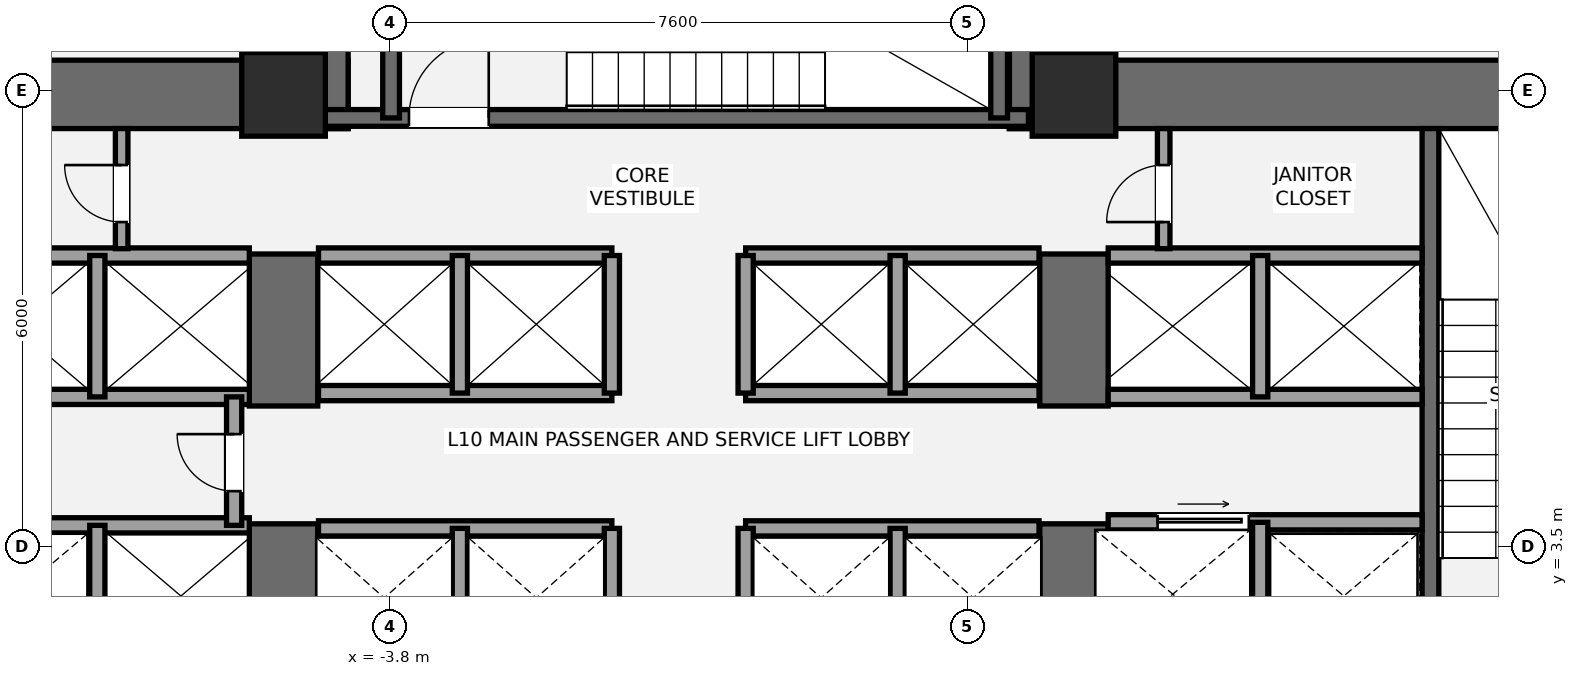
"""IFC4 building model, lengths in metres.
Left out: names, types, materials, properties, quantities, classifications, styles, units other than length and angle.
Written with IfcOpenShell. Run it as: python <this file> out.ifc"""

import sys

from ifc_helpers import new_model, si_unit, direction, frame, frame_2d, origin, origin_2d, place, context, subcontext, project, spatial, rectangle, extrude, element, fill, save


model = new_model("IFC4")
c1 = context("Model", 3, precision=1e-05, world=origin(), true_north=direction((0.0, 1.0)))
c2 = subcontext(c1, "Body", "Model", "MODEL_VIEW")
j1 = project(units=[si_unit("LENGTHUNIT", "METRE"), si_unit("PLANEANGLEUNIT", "RADIAN")], contexts=[c1])
p1 = place(None, origin())
s1 = spatial("IfcSite", under=j1, at=p1, CompositionType="ELEMENT")
p2 = place(p1, origin())
s2 = spatial("IfcBuilding", under=s1, at=p2, CompositionType="ELEMENT")
p3 = place(p2, frame((0.0, 0.0, 41.4)))
s3 = spatial("IfcBuildingStorey", under=s2, at=p3, CompositionType="ELEMENT", Elevation=41.4)
p4 = place(p3, frame((-14.05, 9.45, 0.0), z_axis=(0.0, 0.0, 1.0), x_axis=(1.0, 0.0, 0.0)))
e1 = element("IfcWall", 1, at=p4, inside=s3, PredefinedType="SHEAR", context=c2, shape_type="SweptSolid", body=[
    extrude(rectangle(XDim=9.7, YDim=0.9, at=frame_2d((4.85, 0.0))), origin(), (0.0, 0.0, 1.0), 3.6),
])
p5 = place(p3, frame((-5.2, 0.95, 0.0), z_axis=(0.0, 0.0, 1.0), x_axis=(0.0, 1.0, 0.0)))
e2 = element("IfcWall", 2, at=p5, inside=s3, PredefinedType="SHEAR", context=c2, shape_type="SweptSolid", body=[
    extrude(rectangle(XDim=2.85, YDim=0.9, at=frame_2d((1.425, 0.0))), origin(), (0.0, 0.0, 1.0), 3.6),
])
p6 = place(p3, frame((-5.2, 5.35, 0.0), z_axis=(0.0, 0.0, 1.0), x_axis=(0.0, 1.0, 0.0)))
e3 = element("IfcWall", 3, at=p6, inside=s3, PredefinedType="SHEAR", context=c2, shape_type="SweptSolid", body=[
    extrude(rectangle(XDim=2.0, YDim=0.9, at=frame_2d((1.0, 0.0))), origin(), (0.0, 0.0, 1.0), 3.6),
])
p7 = place(p3, frame((4.35, 9.45, 0.0), z_axis=(0.0, 0.0, 1.0), x_axis=(1.0, 0.0, 0.0)))
e4 = element("IfcWall", 4, at=p7, inside=s3, PredefinedType="SHEAR", context=c2, shape_type="SweptSolid", body=[
    extrude(rectangle(XDim=9.7, YDim=0.9, at=frame_2d((4.85, 0.0))), origin(), (0.0, 0.0, 1.0), 3.6),
])
p8 = place(p3, frame((5.2, 0.95, 0.0), z_axis=(0.0, 0.0, 1.0), x_axis=(0.0, 1.0, 0.0)))
e5 = element("IfcWall", 5, at=p8, inside=s3, PredefinedType="SHEAR", context=c2, shape_type="SweptSolid", body=[
    extrude(rectangle(XDim=2.85, YDim=0.9, at=frame_2d((1.425, 0.0))), origin(), (0.0, 0.0, 1.0), 3.6),
])
p9 = place(p3, frame((5.2, 5.35, 0.0), z_axis=(0.0, 0.0, 1.0), x_axis=(0.0, 1.0, 0.0)))
e6 = element("IfcWall", 6, at=p9, inside=s3, PredefinedType="SHEAR", context=c2, shape_type="SweptSolid", body=[
    extrude(rectangle(XDim=2.0, YDim=0.9, at=frame_2d((1.0, 0.0))), origin(), (0.0, 0.0, 1.0), 3.6),
])
p10 = place(p3, frame((9.89, 1.85, 0.0), z_axis=(0.0, 0.0, 1.0), x_axis=(0.0, 1.0, 0.0)))
e7 = element("IfcWall", 7, at=p10, inside=s3, PredefinedType="SHEAR", context=c2, shape_type="SweptSolid", body=[
    extrude(rectangle(XDim=7.15, YDim=0.22, at=frame_2d((3.575, 0.0))), origin(), (0.0, 0.0, 1.0), 3.6),
])
for number, where, z_axis, x_axis in (
    (8, (-4.8, 9.0, 0.0), (0.0, 0.0, 1.0), (0.0, 1.0, 0.0)),
    (9, (4.8, 9.0, 0.0), (0.0, 0.0, 1.0), (0.0, 1.0, 0.0)),
):
    element("IfcWall", number, at=place(p3, frame(where, z_axis=z_axis, x_axis=x_axis)), inside=s3, PredefinedType="SHEAR", context=c2, shape_type="SweptSolid", body=[
        extrude(rectangle(XDim=4.3, YDim=0.9, at=frame_2d((2.15, 0.0))), origin(), (0.0, 0.0, 1.0), 3.6),
    ])
p11 = place(p3, frame((-4.7, 9.14, 0.0), z_axis=(0.0, 0.0, 1.0), x_axis=(1.0, 0.0, 0.0)))
e10 = element("IfcWall", 10, at=p11, inside=s3, PredefinedType="SHEAR", context=c2, shape_type="SweptSolid", body=[
    extrude(rectangle(XDim=9.3, YDim=0.22, at=frame_2d((4.65, 0.0))), origin(), (0.0, 0.0, 1.0), 3.6),
])
p12 = place(p11, frame((1.15, 0.0, 0.0)))
e11 = element("IfcOpeningElement", 11, at=p12, cuts=e10, PredefinedType="OPENING", context=c2, shape_type="SweptSolid", body=[
    extrude(rectangle(XDim=1.05, YDim=2.15, at=frame_2d((0.525, 1.075))), frame((0.0, 0.12, 0.0), z_axis=(0.0, -1.0, 0.0), x_axis=(1.0, 0.0, 0.0)), (0.0, 0.0, 1.0), 0.24),
])
for number, where, z_axis, x_axis in (
    (12, (-3.785, 9.14, 0.0), (0.0, 0.0, 1.0), (0.0, 1.0, 0.0)),
    (13, (4.215, 9.14, 0.0), (0.0, 0.0, 1.0), (0.0, 1.0, 0.0)),
):
    element("IfcWall", number, at=place(p3, frame(where, z_axis=z_axis, x_axis=x_axis)), inside=s3, PredefinedType="SHEAR", context=c2, shape_type="SweptSolid", body=[
        extrude(rectangle(XDim=3.26, YDim=0.22, at=frame_2d((1.63, 0.0))), origin(), (0.0, 0.0, 1.0), 3.6),
    ])
for number, where, z_axis, x_axis in (
    (14, (-5.2, 9.45, 0.0), (0.0, 0.0, 1.0), (1.0, 0.0, 0.0)),
    (15, (5.2, 9.45, 0.0), (0.0, 0.0, 1.0), (1.0, 0.0, 0.0)),
):
    element("IfcColumn", number, at=place(p3, frame(where, z_axis=z_axis, x_axis=x_axis)), inside=s3, PredefinedType="COLUMN", context=c2, shape_type="SweptSolid", body=[
        extrude(rectangle(XDim=1.1, YDim=1.1, at=origin_2d()), origin(), (0.0, 0.0, 1.0), 3.6),
    ])
p13 = place(p3, frame((-9.78, 3.78, 0.0), z_axis=(0.0, 0.0, 1.0), x_axis=(1.0, 0.0, 0.0)))
e16 = element("IfcWall", 16, at=p13, inside=s3, PredefinedType="SOLIDWALL", context=c2, shape_type="SweptSolid", body=[
    extrude(rectangle(XDim=4.13, YDim=0.2, at=frame_2d((2.065, 0.0))), origin(), (0.0, 0.0, 1.0), 3.4),
])
p14 = place(p3, frame((-7.65, 1.85, 0.0), z_axis=(0.0, 0.0, 1.0), x_axis=(0.0, 1.0, 0.0)))
e17 = element("IfcWall", 17, at=p14, inside=s3, PredefinedType="SOLIDWALL", context=c2, shape_type="SweptSolid", body=[
    extrude(rectangle(XDim=1.93, YDim=0.2, at=frame_2d((0.965, 0.0))), origin(), (0.0, 0.0, 1.0), 3.4),
])
for number, where, z_axis, x_axis in (
    (18, (-9.78, 5.47, 0.0), (0.0, 0.0, 1.0), (1.0, 0.0, 0.0)),
    (19, (-9.78, 7.33, 0.0), (0.0, 0.0, 1.0), (1.0, 0.0, 0.0)),
):
    element("IfcWall", number, at=place(p3, frame(where, z_axis=z_axis, x_axis=x_axis)), inside=s3, PredefinedType="SOLIDWALL", context=c2, shape_type="SweptSolid", body=[
        extrude(rectangle(XDim=4.13, YDim=0.2, at=frame_2d((2.065, 0.0))), origin(), (0.0, 0.0, 1.0), 3.4),
    ])
p15 = place(p3, frame((-7.65, 5.47, 0.0), z_axis=(0.0, 0.0, 1.0), x_axis=(0.0, 1.0, 0.0)))
e20 = element("IfcWall", 20, at=p15, inside=s3, PredefinedType="SOLIDWALL", context=c2, shape_type="SweptSolid", body=[
    extrude(rectangle(XDim=1.86, YDim=0.2, at=frame_2d((0.93, 0.0))), origin(), (0.0, 0.0, 1.0), 3.4),
])
p16 = place(p3, frame((-5.85, 3.78, 0.0), z_axis=(0.0, 0.0, 1.0), x_axis=(0.0, 1.0, 0.0)))
e21 = element("IfcWall", 21, at=p16, inside=s3, PredefinedType="SOLIDWALL", context=c2, shape_type="SweptSolid", body=[
    extrude(rectangle(XDim=1.69, YDim=0.2, at=frame_2d((0.845, 0.0))), origin(), (0.0, 0.0, 1.0), 3.4),
])
p17 = place(p16, frame((0.45, 0.0, 0.0)))
e22 = element("IfcOpeningElement", 22, at=p17, cuts=e21, PredefinedType="OPENING", context=c2, shape_type="SweptSolid", body=[
    extrude(rectangle(XDim=0.75, YDim=2.1, at=frame_2d((0.375, 1.05))), frame((0.0, 0.11, 0.0), z_axis=(0.0, -1.0, 0.0), x_axis=(1.0, 0.0, 0.0)), (0.0, 0.0, 1.0), 0.22),
])
p18 = place(p3, frame((5.65, 3.82, 0.0), z_axis=(0.0, 0.0, 1.0), x_axis=(1.0, 0.0, 0.0)))
e23 = element("IfcWall", 23, at=p18, inside=s3, PredefinedType="SOLIDWALL", context=c2, shape_type="SweptSolid", body=[
    extrude(rectangle(XDim=4.13, YDim=0.2, at=frame_2d((2.065, 0.0))), origin(), (0.0, 0.0, 1.0), 3.4),
])
p19 = place(p18, frame((0.65, 0.0, 0.0)))
e24 = element("IfcOpeningElement", 24, at=p19, cuts=e23, PredefinedType="OPENING", context=c2, shape_type="SweptSolid", body=[
    extrude(rectangle(XDim=1.2, YDim=2.2, at=frame_2d((0.6, 1.1))), frame((0.0, 0.11, 0.0), z_axis=(0.0, -1.0, 0.0), x_axis=(1.0, 0.0, 0.0)), (0.0, 0.0, 1.0), 0.22),
])
p20 = place(p3, frame((7.65, 1.85, 0.0), z_axis=(0.0, 0.0, 1.0), x_axis=(0.0, 1.0, 0.0)))
e25 = element("IfcWall", 25, at=p20, inside=s3, PredefinedType="SOLIDWALL", context=c2, shape_type="SweptSolid", body=[
    extrude(rectangle(XDim=1.97, YDim=0.2, at=frame_2d((0.985, 0.0))), origin(), (0.0, 0.0, 1.0), 3.4),
])
for number, where, z_axis, x_axis in (
    (26, (5.65, 5.47, 0.0), (0.0, 0.0, 1.0), (1.0, 0.0, 0.0)),
    (27, (5.65, 7.33, 0.0), (0.0, 0.0, 1.0), (1.0, 0.0, 0.0)),
):
    element("IfcWall", number, at=place(p3, frame(where, z_axis=z_axis, x_axis=x_axis)), inside=s3, PredefinedType="SOLIDWALL", context=c2, shape_type="SweptSolid", body=[
        extrude(rectangle(XDim=4.13, YDim=0.2, at=frame_2d((2.065, 0.0))), origin(), (0.0, 0.0, 1.0), 3.4),
    ])
p21 = place(p3, frame((7.65, 5.47, 0.0), z_axis=(0.0, 0.0, 1.0), x_axis=(0.0, 1.0, 0.0)))
e28 = element("IfcWall", 28, at=p21, inside=s3, PredefinedType="SOLIDWALL", context=c2, shape_type="SweptSolid", body=[
    extrude(rectangle(XDim=1.86, YDim=0.2, at=frame_2d((0.93, 0.0))), origin(), (0.0, 0.0, 1.0), 3.4),
])
for number, where, z_axis, x_axis in (
    (29, (-4.74, 3.74, 0.0), (0.0, 0.0, 1.0), (1.0, 0.0, 0.0)),
    (30, (0.88, 3.74, 0.0), (0.0, 0.0, 1.0), (1.0, 0.0, 0.0)),
):
    element("IfcWall", number, at=place(p3, frame(where, z_axis=z_axis, x_axis=x_axis)), inside=s3, PredefinedType="SOLIDWALL", context=c2, shape_type="SweptSolid", body=[
        extrude(rectangle(XDim=3.86, YDim=0.2, at=frame_2d((1.93, 0.0))), origin(), (0.0, 0.0, 1.0), 3.4),
    ])
for number, where, z_axis, x_axis in (
    (31, (-2.88, 1.92, 0.0), (0.0, 0.0, 1.0), (0.0, 1.0, 0.0)),
    (32, (2.88, 1.92, 0.0), (0.0, 0.0, 1.0), (0.0, 1.0, 0.0)),
    (33, (-0.88, 1.92, 0.0), (0.0, 0.0, 1.0), (0.0, 1.0, 0.0)),
    (34, (0.88, 1.92, 0.0), (0.0, 0.0, 1.0), (0.0, 1.0, 0.0)),
):
    element("IfcWall", number, at=place(p3, frame(where, z_axis=z_axis, x_axis=x_axis)), inside=s3, PredefinedType="SOLIDWALL", context=c2, shape_type="SweptSolid", body=[
        extrude(rectangle(XDim=1.82, YDim=0.2, at=frame_2d((0.91, 0.0))), origin(), (0.0, 0.0, 1.0), 3.4),
    ])
for number, where, z_axis, x_axis in (
    (35, (-4.74, 5.52, 0.0), (0.0, 0.0, 1.0), (1.0, 0.0, 0.0)),
    (36, (0.88, 5.52, 0.0), (0.0, 0.0, 1.0), (1.0, 0.0, 0.0)),
    (37, (-4.74, 7.33, 0.0), (0.0, 0.0, 1.0), (1.0, 0.0, 0.0)),
    (38, (0.88, 7.33, 0.0), (0.0, 0.0, 1.0), (1.0, 0.0, 0.0)),
):
    element("IfcWall", number, at=place(p3, frame(where, z_axis=z_axis, x_axis=x_axis)), inside=s3, PredefinedType="SOLIDWALL", context=c2, shape_type="SweptSolid", body=[
        extrude(rectangle(XDim=3.86, YDim=0.2, at=frame_2d((1.93, 0.0))), origin(), (0.0, 0.0, 1.0), 3.4),
    ])
for number, where, z_axis, x_axis in (
    (39, (-2.88, 5.52, 0.0), (0.0, 0.0, 1.0), (0.0, 1.0, 0.0)),
    (40, (2.88, 5.52, 0.0), (0.0, 0.0, 1.0), (0.0, 1.0, 0.0)),
    (41, (-0.88, 5.52, 0.0), (0.0, 0.0, 1.0), (0.0, 1.0, 0.0)),
    (42, (0.88, 5.52, 0.0), (0.0, 0.0, 1.0), (0.0, 1.0, 0.0)),
):
    element("IfcWall", number, at=place(p3, frame(where, z_axis=z_axis, x_axis=x_axis)), inside=s3, PredefinedType="SOLIDWALL", context=c2, shape_type="SweptSolid", body=[
        extrude(rectangle(XDim=1.81, YDim=0.2, at=frame_2d((0.905, 0.0))), origin(), (0.0, 0.0, 1.0), 3.4),
    ])
p22 = place(p3, frame((-7.33, 7.42, 0.0), z_axis=(0.0, 0.0, 1.0), x_axis=(0.0, 1.0, 0.0)))
e43 = element("IfcWall", 43, at=p22, inside=s3, PredefinedType="PARTITIONING", context=c2, shape_type="SweptSolid", body=[
    extrude(rectangle(XDim=1.58, YDim=0.165, at=frame_2d((0.79, 0.0))), origin(), (0.0, 0.0, 1.0), 3.4),
])
p23 = place(p22, frame((0.35, 0.0, 0.0)))
e44 = element("IfcOpeningElement", 44, at=p23, cuts=e43, PredefinedType="OPENING", context=c2, shape_type="SweptSolid", body=[
    extrude(rectangle(XDim=0.75, YDim=2.1, at=frame_2d((0.375, 1.05))), frame((0.0, 0.093, 0.0), z_axis=(0.0, -1.0, 0.0), x_axis=(1.0, 0.0, 0.0)), (0.0, 0.0, 1.0), 0.185),
])
p24 = place(p3, frame((6.38, 7.42, 0.0), z_axis=(0.0, 0.0, 1.0), x_axis=(0.0, 1.0, 0.0)))
e45 = element("IfcWall", 45, at=p24, inside=s3, PredefinedType="PARTITIONING", context=c2, shape_type="SweptSolid", body=[
    extrude(rectangle(XDim=1.58, YDim=0.165, at=frame_2d((0.79, 0.0))), origin(), (0.0, 0.0, 1.0), 3.4),
])
p25 = place(p24, frame((0.35, 0.0, 0.0)))
e46 = element("IfcOpeningElement", 46, at=p25, cuts=e45, PredefinedType="OPENING", context=c2, shape_type="SweptSolid", body=[
    extrude(rectangle(XDim=0.75, YDim=2.1, at=frame_2d((0.375, 1.05))), frame((0.0, 0.093, 0.0), z_axis=(0.0, -1.0, 0.0), x_axis=(1.0, 0.0, 0.0)), (0.0, 0.0, 1.0), 0.185),
])
p26 = place(p12, origin())
e47 = element("IfcDoor", 47, at=p26, inside=s3, OperationType="SINGLE_SWING_RIGHT", PredefinedType="DOOR", context=c2, shape_type="SweptSolid", body=[
    extrude(rectangle(XDim=1.05, YDim=2.15, at=frame_2d((0.525, 1.075))), frame((0.0, 0.025, 0.0), z_axis=(0.0, -1.0, 0.0), x_axis=(1.0, 0.0, 0.0)), (0.0, 0.0, 1.0), 0.05),
])
fill(e11, e47)
p27 = place(p17, origin())
e48 = element("IfcDoor", 48, at=p27, inside=s3, OperationType="SINGLE_SWING_RIGHT", PredefinedType="DOOR", context=c2, shape_type="SweptSolid", body=[
    extrude(rectangle(XDim=0.75, YDim=2.1, at=frame_2d((0.375, 1.05))), frame((0.0, 0.025, 0.0), z_axis=(0.0, -1.0, 0.0), x_axis=(1.0, 0.0, 0.0)), (0.0, 0.0, 1.0), 0.05),
])
fill(e22, e48)
p28 = place(p19, origin())
e49 = element("IfcDoor", 49, at=p28, inside=s3, OperationType="SLIDING_TO_RIGHT", PredefinedType="DOOR", context=c2, shape_type="SweptSolid", body=[
    extrude(rectangle(XDim=1.2, YDim=2.2, at=frame_2d((0.6, 1.1))), frame((0.0, 0.025, 0.0), z_axis=(0.0, -1.0, 0.0), x_axis=(1.0, 0.0, 0.0)), (0.0, 0.0, 1.0), 0.05),
])
fill(e24, e49)
p29 = place(p23, origin())
e50 = element("IfcDoor", 50, at=p29, inside=s3, OperationType="SINGLE_SWING_RIGHT", PredefinedType="DOOR", context=c2, shape_type="SweptSolid", body=[
    extrude(rectangle(XDim=0.75, YDim=2.1, at=frame_2d((0.375, 1.05))), frame((0.0, 0.025, 0.0), z_axis=(0.0, -1.0, 0.0), x_axis=(1.0, 0.0, 0.0)), (0.0, 0.0, 1.0), 0.05),
])
fill(e44, e50)
p30 = place(p25, origin())
e51 = element("IfcDoor", 51, at=p30, inside=s3, OperationType="SINGLE_SWING_LEFT", PredefinedType="DOOR", context=c2, shape_type="SweptSolid", body=[
    extrude(rectangle(XDim=0.75, YDim=2.1, at=frame_2d((0.375, 1.05))), frame((0.0, 0.025, 0.0), z_axis=(0.0, -1.0, 0.0), x_axis=(1.0, 0.0, 0.0)), (0.0, 0.0, 1.0), 0.05),
])
fill(e46, e51)
save(model, sys.argv[1])
